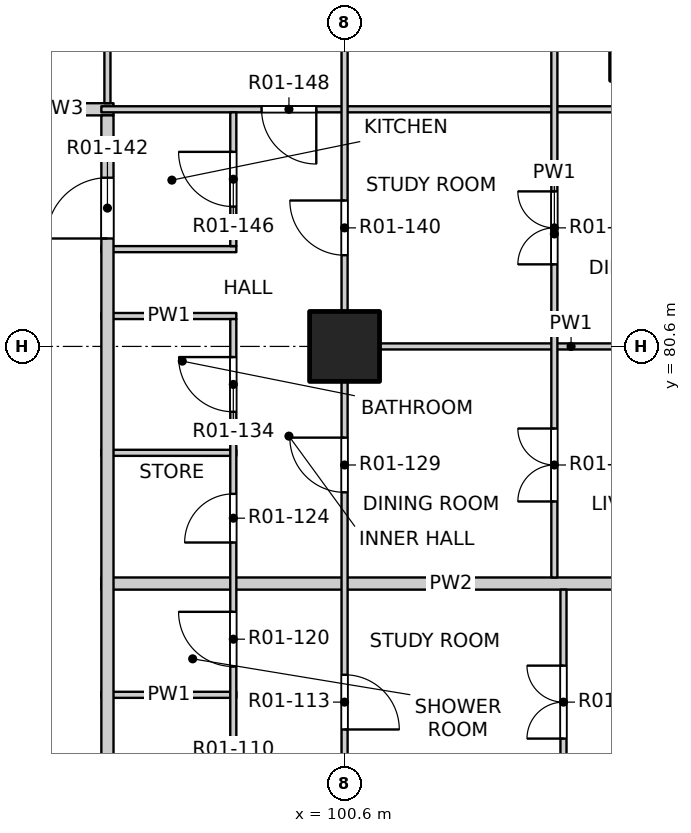
"""IFC4 building model, lengths in metres.
Left out: names, types, materials, properties, quantities, classifications, styles, units other than length and angle.
Written with IfcOpenShell. Run it as: python <this file> out.ifc"""

import sys

from ifc_helpers import new_model, si_unit, direction, frame, frame_2d, origin, origin_2d, place, context, subcontext, project, spatial, rectangle, extrude, element, fill, save


model = new_model("IFC4")
c1 = context("Model", 3, precision=1e-05, world=origin(), true_north=direction((0.0, 1.0)))
c2 = subcontext(c1, "Body", "Model", "MODEL_VIEW")
j1 = project(units=[si_unit("LENGTHUNIT", "METRE"), si_unit("PLANEANGLEUNIT", "RADIAN")], contexts=[c1])
p1 = place(None, origin())
s1 = spatial("IfcSite", under=j1, at=p1, CompositionType="ELEMENT")
p2 = place(p1, origin())
s2 = spatial("IfcBuilding", under=s1, at=p2, CompositionType="ELEMENT")
p3 = place(p2, frame((0.0, 0.0, 19.5)))
s3 = spatial("IfcBuildingStorey", under=s2, at=p3, CompositionType="ELEMENT", Elevation=19.5)
p4 = place(p3, frame((105.5, 85.5, -0.25), z_axis=(0.0, 0.0, 1.0), x_axis=(1.0, 0.0, 0.0)))
e1 = element("IfcColumn", 1, at=p4, inside=s3, PredefinedType="COLUMN", context=c2, shape_type="SweptSolid", body=[
    extrude(rectangle(XDim=1.05, YDim=1.05, at=origin_2d()), origin(), (0.0, 0.0, 1.0), 3.4),
])
p5 = place(p3, frame((100.6, 80.6, -0.25), z_axis=(0.0, 0.0, 1.0), x_axis=(1.0, 0.0, 0.0)))
e2 = element("IfcColumn", 2, at=p5, inside=s3, PredefinedType="COLUMN", context=c2, shape_type="SweptSolid", body=[
    extrude(rectangle(XDim=1.15, YDim=1.15, at=origin_2d()), origin(), (0.0, 0.0, 1.0), 3.4),
])
p6 = place(p3, frame((96.6, 74.87, 0.0), z_axis=(0.0, 0.0, 1.0), x_axis=(1.0, 0.0, 0.0)))
e3 = element("IfcWall", 3, at=p6, inside=s3, PredefinedType="PARTITIONING", context=c2, shape_type="SweptSolid", body=[
    extrude(rectangle(XDim=2.22, YDim=0.1, at=frame_2d((1.11, 0.0))), origin(), (0.0, 0.0, 1.0), 3.15),
])
p7 = place(p3, frame((96.6, 76.7, 0.0), z_axis=(0.0, 0.0, 1.0), x_axis=(1.0, 0.0, 0.0)))
e4 = element("IfcWall", 4, at=p7, inside=s3, PredefinedType="PARTITIONING", context=c2, shape_type="SweptSolid", body=[
    extrude(rectangle(XDim=11.5, YDim=0.2, at=frame_2d((5.75, 0.0))), origin(), (0.0, 0.0, 1.0), 3.15),
])
p8 = place(p3, frame((96.6, 78.85, 0.0), z_axis=(0.0, 0.0, 1.0), x_axis=(1.0, 0.0, 0.0)))
e5 = element("IfcWall", 5, at=p8, inside=s3, PredefinedType="PARTITIONING", context=c2, shape_type="SweptSolid", body=[
    extrude(rectangle(XDim=2.22, YDim=0.1, at=frame_2d((1.11, 0.0))), origin(), (0.0, 0.0, 1.0), 3.15),
])
p9 = place(p3, frame((100.55, 80.6, 0.0), z_axis=(0.0, 0.0, 1.0), x_axis=(1.0, 0.0, 0.0)))
e6 = element("IfcWall", 6, at=p9, inside=s3, PredefinedType="PARTITIONING", context=c2, shape_type="SweptSolid", body=[
    extrude(rectangle(XDim=7.55, YDim=0.1, at=frame_2d((3.775, 0.0))), origin(), (0.0, 0.0, 1.0), 2.55),
])
for number, where, z_axis, x_axis in (
    (7, (96.6, 81.1, 0.0), (0.0, 0.0, 1.0), (1.0, 0.0, 0.0)),
    (8, (96.6, 82.2, 0.0), (0.0, 0.0, 1.0), (1.0, 0.0, 0.0)),
):
    element("IfcWall", number, at=place(p3, frame(where, z_axis=z_axis, x_axis=x_axis)), inside=s3, PredefinedType="PARTITIONING", context=c2, shape_type="SweptSolid", body=[
        extrude(rectangle(XDim=2.22, YDim=0.1, at=frame_2d((1.11, 0.0))), origin(), (0.0, 0.0, 1.0), 3.15),
    ])
p10 = place(p3, frame((95.1, 84.5, 0.0), z_axis=(0.0, 0.0, 1.0), x_axis=(1.0, 0.0, 0.0)))
e9 = element("IfcWall", 9, at=p10, inside=s3, PredefinedType="PARTITIONING", context=c2, shape_type="SweptSolid", body=[
    extrude(rectangle(XDim=1.7, YDim=0.2, at=frame_2d((0.85, 0.0))), origin(), (0.0, 0.0, 1.0), 3.15),
])
p11 = place(p3, frame((96.6, 84.5, 0.0), z_axis=(0.0, 0.0, 1.0), x_axis=(1.0, 0.0, 0.0)))
e10 = element("IfcWall", 10, at=p11, inside=s3, PredefinedType="PARTITIONING", context=c2, shape_type="SweptSolid", body=[
    extrude(rectangle(XDim=11.5, YDim=0.1, at=frame_2d((5.75, 0.0))), origin(), (0.0, 0.0, 1.0), 3.15),
])
p12 = place(p11, frame((2.635, 0.0, 0.0)))
e11 = element("IfcOpeningElement", 11, at=p12, cuts=e10, PredefinedType="OPENING", context=c2, shape_type="SweptSolid", body=[
    extrude(rectangle(XDim=0.9, YDim=2.1, at=frame_2d((0.45, 1.05))), frame((0.0, 0.06, 0.0), z_axis=(0.0, -1.0, 0.0), x_axis=(1.0, 0.0, 0.0)), (0.0, 0.0, 1.0), 0.12),
])
p13 = place(p3, frame((96.7, 53.4, 0.0), z_axis=(0.0, 0.0, 1.0), x_axis=(0.0, 1.0, 0.0)))
e12 = element("IfcWall", 12, at=p13, inside=s3, PredefinedType="PARTITIONING", context=c2, shape_type="SweptSolid", body=[
    extrude(rectangle(XDim=31.0, YDim=0.2, at=frame_2d((15.5, 0.0))), origin(), (0.0, 0.0, 1.0), 3.15),
])
p14 = place(p13, frame((5.575, 0.0, 0.0)))
e13 = element("IfcOpeningElement", 13, at=p14, cuts=e12, PredefinedType="OPENING", context=c2, shape_type="SweptSolid", body=[
    extrude(rectangle(XDim=1.0, YDim=2.1, at=frame_2d((0.5, 1.05))), frame((0.0, 0.11, 0.0), z_axis=(0.0, -1.0, 0.0), x_axis=(1.0, 0.0, 0.0)), (0.0, 0.0, 1.0), 0.22),
])
p15 = place(p13, frame((10.075, 0.0, 0.0)))
e14 = element("IfcOpeningElement", 14, at=p15, cuts=e12, PredefinedType="OPENING", context=c2, shape_type="SweptSolid", body=[
    extrude(rectangle(XDim=1.0, YDim=2.1, at=frame_2d((0.5, 1.05))), frame((0.0, 0.11, 0.0), z_axis=(0.0, -1.0, 0.0), x_axis=(1.0, 0.0, 0.0)), (0.0, 0.0, 1.0), 0.22),
])
p16 = place(p13, frame((28.975, 0.0, 0.0)))
e15 = element("IfcOpeningElement", 15, at=p16, cuts=e12, PredefinedType="OPENING", context=c2, shape_type="SweptSolid", body=[
    extrude(rectangle(XDim=1.0, YDim=2.1, at=frame_2d((0.5, 1.05))), frame((0.0, 0.11, 0.0), z_axis=(0.0, -1.0, 0.0), x_axis=(1.0, 0.0, 0.0)), (0.0, 0.0, 1.0), 0.22),
])
p17 = place(p3, frame((96.7, 84.6, 0.0), z_axis=(0.0, 0.0, 1.0), x_axis=(0.0, 1.0, 0.0)))
e16 = element("IfcWall", 16, at=p17, inside=s3, PredefinedType="PARTITIONING", context=c2, shape_type="SweptSolid", body=[
    extrude(rectangle(XDim=3.5, YDim=0.1, at=frame_2d((1.75, 0.0))), origin(), (0.0, 0.0, 1.0), 3.15),
])
p18 = place(p17, frame((1.4, 0.0, 0.0)))
e17 = element("IfcOpeningElement", 17, at=p18, cuts=e16, PredefinedType="OPENING", context=c2, shape_type="SweptSolid", body=[
    extrude(rectangle(XDim=0.9, YDim=2.1, at=frame_2d((0.45, 1.05))), frame((0.0, 0.06, 0.0), z_axis=(0.0, -1.0, 0.0), x_axis=(1.0, 0.0, 0.0)), (0.0, 0.0, 1.0), 0.12),
])
p19 = place(p3, frame((98.77, 63.35, 0.0), z_axis=(0.0, 0.0, 1.0), x_axis=(0.0, 1.0, 0.0)))
e18 = element("IfcWall", 18, at=p19, inside=s3, PredefinedType="PARTITIONING", context=c2, shape_type="SweptSolid", body=[
    extrude(rectangle(XDim=17.7, YDim=0.1, at=frame_2d((8.85, 0.0))), origin(), (0.0, 0.0, 1.0), 3.15),
])
p20 = place(p19, frame((1.0, 0.0, 0.0)))
e19 = element("IfcOpeningElement", 19, at=p20, cuts=e18, PredefinedType="OPENING", context=c2, shape_type="SweptSolid", body=[
    extrude(rectangle(XDim=0.8, YDim=2.1, at=frame_2d((0.4, 1.05))), frame((0.0, 0.06, 0.0), z_axis=(0.0, -1.0, 0.0), x_axis=(1.0, 0.0, 0.0)), (0.0, 0.0, 1.0), 0.12),
])
p21 = place(p19, frame((3.9, 0.0, 0.0)))
e20 = element("IfcOpeningElement", 20, at=p21, cuts=e18, PredefinedType="OPENING", context=c2, shape_type="SweptSolid", body=[
    extrude(rectangle(XDim=0.8, YDim=2.1, at=frame_2d((0.4, 1.05))), frame((0.0, 0.06, 0.0), z_axis=(0.0, -1.0, 0.0), x_axis=(1.0, 0.0, 0.0)), (0.0, 0.0, 1.0), 0.12),
])
p22 = place(p19, frame((6.5, 0.0, 0.0)))
e21 = element("IfcOpeningElement", 21, at=p22, cuts=e18, PredefinedType="OPENING", context=c2, shape_type="SweptSolid", body=[
    extrude(rectangle(XDim=0.9, YDim=2.1, at=frame_2d((0.45, 1.05))), frame((0.0, 0.06, 0.0), z_axis=(0.0, -1.0, 0.0), x_axis=(1.0, 0.0, 0.0)), (0.0, 0.0, 1.0), 0.12),
])
p23 = place(p19, frame((9.385, 0.0, 0.0)))
e22 = element("IfcOpeningElement", 22, at=p23, cuts=e18, PredefinedType="OPENING", context=c2, shape_type="SweptSolid", body=[
    extrude(rectangle(XDim=0.9, YDim=2.1, at=frame_2d((0.45, 1.05))), frame((0.0, 0.06, 0.0), z_axis=(0.0, -1.0, 0.0), x_axis=(1.0, 0.0, 0.0)), (0.0, 0.0, 1.0), 0.12),
])
p24 = place(p19, frame((11.985, 0.0, 0.0)))
e23 = element("IfcOpeningElement", 23, at=p24, cuts=e18, PredefinedType="OPENING", context=c2, shape_type="SweptSolid", body=[
    extrude(rectangle(XDim=0.9, YDim=2.1, at=frame_2d((0.45, 1.05))), frame((0.0, 0.06, 0.0), z_axis=(0.0, -1.0, 0.0), x_axis=(1.0, 0.0, 0.0)), (0.0, 0.0, 1.0), 0.12),
])
p25 = place(p19, frame((14.025, 0.0, 0.0)))
e24 = element("IfcOpeningElement", 24, at=p25, cuts=e18, PredefinedType="OPENING", context=c2, shape_type="SweptSolid", body=[
    extrude(rectangle(XDim=0.8, YDim=2.1, at=frame_2d((0.4, 1.05))), frame((0.0, 0.06, 0.0), z_axis=(0.0, -1.0, 0.0), x_axis=(1.0, 0.0, 0.0)), (0.0, 0.0, 1.0), 0.12),
])
p26 = place(p19, frame((16.175, 0.0, 0.0)))
e25 = element("IfcOpeningElement", 25, at=p26, cuts=e18, PredefinedType="OPENING", context=c2, shape_type="SweptSolid", body=[
    extrude(rectangle(XDim=0.9, YDim=2.1, at=frame_2d((0.45, 1.05))), frame((0.0, 0.06, 0.0), z_axis=(0.0, -1.0, 0.0), x_axis=(1.0, 0.0, 0.0)), (0.0, 0.0, 1.0), 0.12),
])
p27 = place(p3, frame((98.77, 82.25, 0.0), z_axis=(0.0, 0.0, 1.0), x_axis=(0.0, 1.0, 0.0)))
e26 = element("IfcWall", 26, at=p27, inside=s3, PredefinedType="PARTITIONING", context=c2, shape_type="SweptSolid", body=[
    extrude(rectangle(XDim=2.2, YDim=0.1, at=frame_2d((1.1, 0.0))), origin(), (0.0, 0.0, 1.0), 3.15),
])
p28 = place(p27, frame((0.65, 0.0, 0.0)))
e27 = element("IfcOpeningElement", 27, at=p28, cuts=e26, PredefinedType="OPENING", context=c2, shape_type="SweptSolid", body=[
    extrude(rectangle(XDim=0.9, YDim=2.1, at=frame_2d((0.45, 1.05))), frame((0.0, 0.06, 0.0), z_axis=(0.0, -1.0, 0.0), x_axis=(1.0, 0.0, 0.0)), (0.0, 0.0, 1.0), 0.12),
])
p29 = place(p3, frame((100.6, 49.4, 0.0), z_axis=(0.0, 0.0, 1.0), x_axis=(0.0, 1.0, 0.0)))
e28 = element("IfcWall", 28, at=p29, inside=s3, PredefinedType="PARTITIONING", context=c2, shape_type="SweptSolid", body=[
    extrude(rectangle(XDim=31.2, YDim=0.1, at=frame_2d((15.6, 0.0))), origin(), (0.0, 0.0, 1.0), 3.15),
])
p30 = place(p29, frame((1.5, 0.0, 0.0)))
e29 = element("IfcOpeningElement", 29, at=p30, cuts=e28, PredefinedType="OPENING", context=c2, shape_type="SweptSolid", body=[
    extrude(rectangle(XDim=0.9, YDim=2.1, at=frame_2d((0.45, 1.05))), frame((0.0, 0.06, 0.0), z_axis=(0.0, -1.0, 0.0), x_axis=(1.0, 0.0, 0.0)), (0.0, 0.0, 1.0), 0.12),
])
p31 = place(p29, frame((5.4, 0.0, 0.0)))
e30 = element("IfcOpeningElement", 30, at=p31, cuts=e28, PredefinedType="OPENING", context=c2, shape_type="SweptSolid", body=[
    extrude(rectangle(XDim=0.9, YDim=2.1, at=frame_2d((0.45, 1.05))), frame((0.0, 0.06, 0.0), z_axis=(0.0, -1.0, 0.0), x_axis=(1.0, 0.0, 0.0)), (0.0, 0.0, 1.0), 0.12),
])
p32 = place(p29, frame((10.275, 0.0, 0.0)))
e31 = element("IfcOpeningElement", 31, at=p32, cuts=e28, PredefinedType="OPENING", context=c2, shape_type="SweptSolid", body=[
    extrude(rectangle(XDim=0.9, YDim=2.1, at=frame_2d((0.45, 1.05))), frame((0.0, 0.06, 0.0), z_axis=(0.0, -1.0, 0.0), x_axis=(1.0, 0.0, 0.0)), (0.0, 0.0, 1.0), 0.12),
])
p33 = place(p29, frame((14.0, 0.0, 0.0)))
e32 = element("IfcOpeningElement", 32, at=p33, cuts=e28, PredefinedType="OPENING", context=c2, shape_type="SweptSolid", body=[
    extrude(rectangle(XDim=0.9, YDim=2.1, at=frame_2d((0.45, 1.05))), frame((0.0, 0.06, 0.0), z_axis=(0.0, -1.0, 0.0), x_axis=(1.0, 0.0, 0.0)), (0.0, 0.0, 1.0), 0.12),
])
p34 = place(p29, frame((17.1, 0.0, 0.0)))
e33 = element("IfcOpeningElement", 33, at=p34, cuts=e28, PredefinedType="OPENING", context=c2, shape_type="SweptSolid", body=[
    extrude(rectangle(XDim=0.9, YDim=2.1, at=frame_2d((0.45, 1.05))), frame((0.0, 0.06, 0.0), z_axis=(0.0, -1.0, 0.0), x_axis=(1.0, 0.0, 0.0)), (0.0, 0.0, 1.0), 0.12),
])
p35 = place(p29, frame((21.8, 0.0, 0.0)))
e34 = element("IfcOpeningElement", 34, at=p35, cuts=e28, PredefinedType="OPENING", context=c2, shape_type="SweptSolid", body=[
    extrude(rectangle(XDim=0.9, YDim=2.1, at=frame_2d((0.45, 1.05))), frame((0.0, 0.06, 0.0), z_axis=(0.0, -1.0, 0.0), x_axis=(1.0, 0.0, 0.0)), (0.0, 0.0, 1.0), 0.12),
])
p36 = place(p29, frame((24.9, 0.0, 0.0)))
e35 = element("IfcOpeningElement", 35, at=p36, cuts=e28, PredefinedType="OPENING", context=c2, shape_type="SweptSolid", body=[
    extrude(rectangle(XDim=0.9, YDim=2.1, at=frame_2d((0.45, 1.05))), frame((0.0, 0.06, 0.0), z_axis=(0.0, -1.0, 0.0), x_axis=(1.0, 0.0, 0.0)), (0.0, 0.0, 1.0), 0.12),
])
p37 = place(p29, frame((28.8, 0.0, 0.0)))
e36 = element("IfcOpeningElement", 36, at=p37, cuts=e28, PredefinedType="OPENING", context=c2, shape_type="SweptSolid", body=[
    extrude(rectangle(XDim=0.9, YDim=2.1, at=frame_2d((0.45, 1.05))), frame((0.0, 0.06, 0.0), z_axis=(0.0, -1.0, 0.0), x_axis=(1.0, 0.0, 0.0)), (0.0, 0.0, 1.0), 0.12),
])
p38 = place(p3, frame((100.6, 80.6, 0.0), z_axis=(0.0, 0.0, 1.0), x_axis=(0.0, 1.0, 0.0)))
e37 = element("IfcWall", 37, at=p38, inside=s3, PredefinedType="PARTITIONING", context=c2, shape_type="SweptSolid", body=[
    extrude(rectangle(XDim=7.5, YDim=0.1, at=frame_2d((3.75, 0.0))), origin(), (0.0, 0.0, 1.0), 2.55),
])
p39 = place(p38, frame((1.5, 0.0, 0.0)))
e38 = element("IfcOpeningElement", 38, at=p39, cuts=e37, PredefinedType="OPENING", context=c2, shape_type="SweptSolid", body=[
    extrude(rectangle(XDim=0.9, YDim=2.1, at=frame_2d((0.45, 1.05))), frame((0.0, 0.06, 0.0), z_axis=(0.0, -1.0, 0.0), x_axis=(1.0, 0.0, 0.0)), (0.0, 0.0, 1.0), 0.12),
])
p40 = place(p38, frame((5.4, 0.0, 0.0)))
e39 = element("IfcOpeningElement", 39, at=p40, cuts=e37, PredefinedType="OPENING", context=c2, shape_type="SweptSolid", body=[
    extrude(rectangle(XDim=0.9, YDim=2.1, at=frame_2d((0.45, 1.05))), frame((0.0, 0.06, 0.0), z_axis=(0.0, -1.0, 0.0), x_axis=(1.0, 0.0, 0.0)), (0.0, 0.0, 1.0), 0.12),
])
p41 = place(p3, frame((104.05, 76.8, 0.0), z_axis=(0.0, 0.0, 1.0), x_axis=(0.0, 1.0, 0.0)))
e40 = element("IfcWall", 40, at=p41, inside=s3, PredefinedType="PARTITIONING", context=c2, shape_type="SweptSolid", body=[
    extrude(rectangle(XDim=11.3, YDim=0.1, at=frame_2d((5.65, 0.0))), origin(), (0.0, 0.0, 1.0), 3.15),
])
p42 = place(p41, frame((1.25, 0.0, 0.0)))
e41 = element("IfcOpeningElement", 41, at=p42, cuts=e40, PredefinedType="OPENING", context=c2, shape_type="SweptSolid", body=[
    extrude(rectangle(XDim=1.2, YDim=2.1, at=frame_2d((0.6, 1.05))), frame((0.0, 0.06, 0.0), z_axis=(0.0, -1.0, 0.0), x_axis=(1.0, 0.0, 0.0)), (0.0, 0.0, 1.0), 0.12),
])
p43 = place(p41, frame((5.15, 0.0, 0.0)))
e42 = element("IfcOpeningElement", 42, at=p43, cuts=e40, PredefinedType="OPENING", context=c2, shape_type="SweptSolid", body=[
    extrude(rectangle(XDim=1.2, YDim=2.1, at=frame_2d((0.6, 1.05))), frame((0.0, 0.06, 0.0), z_axis=(0.0, -1.0, 0.0), x_axis=(1.0, 0.0, 0.0)), (0.0, 0.0, 1.0), 0.12),
])
p44 = place(p41, frame((9.05, 0.0, 0.0)))
e43 = element("IfcOpeningElement", 43, at=p44, cuts=e40, PredefinedType="OPENING", context=c2, shape_type="SweptSolid", body=[
    extrude(rectangle(XDim=1.2, YDim=2.1, at=frame_2d((0.6, 1.05))), frame((0.0, 0.06, 0.0), z_axis=(0.0, -1.0, 0.0), x_axis=(1.0, 0.0, 0.0)), (0.0, 0.0, 1.0), 0.12),
])
p45 = place(p3, frame((104.2, 61.2, 0.0), z_axis=(0.0, 0.0, 1.0), x_axis=(0.0, 1.0, 0.0)))
e44 = element("IfcWall", 44, at=p45, inside=s3, PredefinedType="PARTITIONING", context=c2, shape_type="SweptSolid", body=[
    extrude(rectangle(XDim=15.4, YDim=0.1, at=frame_2d((7.7, 0.0))), origin(), (0.0, 0.0, 1.0), 3.15),
])
p46 = place(p45, frame((0.425, 0.0, 0.0)))
e45 = element("IfcOpeningElement", 45, at=p46, cuts=e44, PredefinedType="OPENING", context=c2, shape_type="SweptSolid", body=[
    extrude(rectangle(XDim=0.9, YDim=2.1, at=frame_2d((0.45, 1.05))), frame((0.0, 0.06, 0.0), z_axis=(0.0, -1.0, 0.0), x_axis=(1.0, 0.0, 0.0)), (0.0, 0.0, 1.0), 0.12),
])
p47 = place(p45, frame((2.375, 0.0, 0.0)))
e46 = element("IfcOpeningElement", 46, at=p47, cuts=e44, PredefinedType="OPENING", context=c2, shape_type="SweptSolid", body=[
    extrude(rectangle(XDim=0.9, YDim=2.1, at=frame_2d((0.45, 1.05))), frame((0.0, 0.06, 0.0), z_axis=(0.0, -1.0, 0.0), x_axis=(1.0, 0.0, 0.0)), (0.0, 0.0, 1.0), 0.12),
])
p48 = place(p45, frame((5.15, 0.0, 0.0)))
e47 = element("IfcOpeningElement", 47, at=p48, cuts=e44, PredefinedType="OPENING", context=c2, shape_type="SweptSolid", body=[
    extrude(rectangle(XDim=1.2, YDim=2.1, at=frame_2d((0.6, 1.05))), frame((0.0, 0.06, 0.0), z_axis=(0.0, -1.0, 0.0), x_axis=(1.0, 0.0, 0.0)), (0.0, 0.0, 1.0), 0.12),
])
p49 = place(p45, frame((8.225, 0.0, 0.0)))
e48 = element("IfcOpeningElement", 48, at=p49, cuts=e44, PredefinedType="OPENING", context=c2, shape_type="SweptSolid", body=[
    extrude(rectangle(XDim=0.9, YDim=2.1, at=frame_2d((0.45, 1.05))), frame((0.0, 0.06, 0.0), z_axis=(0.0, -1.0, 0.0), x_axis=(1.0, 0.0, 0.0)), (0.0, 0.0, 1.0), 0.12),
])
p50 = place(p45, frame((10.175, 0.0, 0.0)))
e49 = element("IfcOpeningElement", 49, at=p50, cuts=e44, PredefinedType="OPENING", context=c2, shape_type="SweptSolid", body=[
    extrude(rectangle(XDim=0.9, YDim=2.1, at=frame_2d((0.45, 1.05))), frame((0.0, 0.06, 0.0), z_axis=(0.0, -1.0, 0.0), x_axis=(1.0, 0.0, 0.0)), (0.0, 0.0, 1.0), 0.12),
])
p51 = place(p45, frame((12.95, 0.0, 0.0)))
e50 = element("IfcOpeningElement", 50, at=p51, cuts=e44, PredefinedType="OPENING", context=c2, shape_type="SweptSolid", body=[
    extrude(rectangle(XDim=1.2, YDim=2.1, at=frame_2d((0.6, 1.05))), frame((0.0, 0.06, 0.0), z_axis=(0.0, -1.0, 0.0), x_axis=(1.0, 0.0, 0.0)), (0.0, 0.0, 1.0), 0.12),
])
p52 = place(p36, origin())
e51 = element("IfcDoor", 51, at=p52, inside=s3, OperationType="SINGLE_SWING_RIGHT", PredefinedType="DOOR", context=c2, shape_type="SweptSolid", body=[
    extrude(rectangle(XDim=0.9, YDim=2.1, at=frame_2d((0.45, 1.05))), frame((0.0, 0.025, 0.0), z_axis=(0.0, -1.0, 0.0), x_axis=(1.0, 0.0, 0.0)), (0.0, 0.0, 1.0), 0.05),
])
fill(e35, e51)
p53 = place(p51, origin())
e52 = element("IfcDoor", 52, at=p53, inside=s3, OperationType="DOUBLE_DOOR_SINGLE_SWING", PredefinedType="DOOR", context=c2, shape_type="SweptSolid", body=[
    extrude(rectangle(XDim=1.2, YDim=2.1, at=frame_2d((0.6, 1.05))), frame((0.0, 0.025, 0.0), z_axis=(0.0, -1.0, 0.0), x_axis=(1.0, 0.0, 0.0)), (0.0, 0.0, 1.0), 0.05),
])
fill(e50, e52)
p54 = place(p24, origin())
e53 = element("IfcDoor", 53, at=p54, inside=s3, OperationType="SINGLE_SWING_RIGHT", PredefinedType="DOOR", context=c2, shape_type="SweptSolid", body=[
    extrude(rectangle(XDim=0.9, YDim=2.1, at=frame_2d((0.45, 1.05))), frame((0.0, 0.025, 0.0), z_axis=(0.0, -1.0, 0.0), x_axis=(1.0, 0.0, 0.0)), (0.0, 0.0, 1.0), 0.05),
])
fill(e23, e53)
p55 = place(p25, origin())
e54 = element("IfcDoor", 54, at=p55, inside=s3, OperationType="SINGLE_SWING_LEFT", PredefinedType="DOOR", context=c2, shape_type="SweptSolid", body=[
    extrude(rectangle(XDim=0.8, YDim=2.1, at=frame_2d((0.4, 1.05))), frame((0.0, 0.025, 0.0), z_axis=(0.0, -1.0, 0.0), x_axis=(1.0, 0.0, 0.0)), (0.0, 0.0, 1.0), 0.05),
])
fill(e24, e54)
p56 = place(p37, origin())
e55 = element("IfcDoor", 55, at=p56, inside=s3, OperationType="SINGLE_SWING_RIGHT", PredefinedType="DOOR", context=c2, shape_type="SweptSolid", body=[
    extrude(rectangle(XDim=0.9, YDim=2.1, at=frame_2d((0.45, 1.05))), frame((0.0, 0.025, 0.0), z_axis=(0.0, -1.0, 0.0), x_axis=(1.0, 0.0, 0.0)), (0.0, 0.0, 1.0), 0.05),
])
fill(e36, e55)
p57 = place(p42, origin())
e56 = element("IfcDoor", 56, at=p57, inside=s3, OperationType="DOUBLE_DOOR_SINGLE_SWING", PredefinedType="DOOR", context=c2, shape_type="SweptSolid", body=[
    extrude(rectangle(XDim=1.2, YDim=2.1, at=frame_2d((0.6, 1.05))), frame((0.0, 0.025, 0.0), z_axis=(0.0, -1.0, 0.0), x_axis=(1.0, 0.0, 0.0)), (0.0, 0.0, 1.0), 0.05),
])
fill(e41, e56)
p58 = place(p26, origin())
e57 = element("IfcDoor", 57, at=p58, inside=s3, OperationType="SINGLE_SWING_RIGHT", PredefinedType="DOOR", context=c2, shape_type="SweptSolid", body=[
    extrude(rectangle(XDim=0.9, YDim=2.1, at=frame_2d((0.45, 1.05))), frame((0.0, 0.025, 0.0), z_axis=(0.0, -1.0, 0.0), x_axis=(1.0, 0.0, 0.0)), (0.0, 0.0, 1.0), 0.05),
])
fill(e25, e57)
p59 = place(p39, origin())
e58 = element("IfcDoor", 58, at=p59, inside=s3, OperationType="SINGLE_SWING_RIGHT", PredefinedType="DOOR", context=c2, shape_type="SweptSolid", body=[
    extrude(rectangle(XDim=0.9, YDim=2.1, at=frame_2d((0.45, 1.05))), frame((0.0, 0.025, 0.0), z_axis=(0.0, -1.0, 0.0), x_axis=(1.0, 0.0, 0.0)), (0.0, 0.0, 1.0), 0.05),
])
fill(e38, e58)
p60 = place(p43, origin())
e59 = element("IfcDoor", 59, at=p60, inside=s3, OperationType="DOUBLE_DOOR_SINGLE_SWING", PredefinedType="DOOR", context=c2, shape_type="SweptSolid", body=[
    extrude(rectangle(XDim=1.2, YDim=2.1, at=frame_2d((0.6, 1.05))), frame((0.0, 0.025, 0.0), z_axis=(0.0, -1.0, 0.0), x_axis=(1.0, 0.0, 0.0)), (0.0, 0.0, 1.0), 0.05),
])
fill(e42, e59)
p61 = place(p16, origin())
e60 = element("IfcDoor", 60, at=p61, inside=s3, OperationType="SINGLE_SWING_LEFT", PredefinedType="DOOR", context=c2, shape_type="SweptSolid", body=[
    extrude(rectangle(XDim=1.0, YDim=2.1, at=frame_2d((0.5, 1.05))), frame((0.0, 0.025, 0.0), z_axis=(0.0, -1.0, 0.0), x_axis=(1.0, 0.0, 0.0)), (0.0, 0.0, 1.0), 0.05),
])
fill(e15, e60)
p62 = place(p28, origin())
e61 = element("IfcDoor", 61, at=p62, inside=s3, OperationType="SINGLE_SWING_RIGHT", PredefinedType="DOOR", context=c2, shape_type="SweptSolid", body=[
    extrude(rectangle(XDim=0.9, YDim=2.1, at=frame_2d((0.45, 1.05))), frame((0.0, 0.025, 0.0), z_axis=(0.0, -1.0, 0.0), x_axis=(1.0, 0.0, 0.0)), (0.0, 0.0, 1.0), 0.05),
])
fill(e27, e61)
p63 = place(p12, origin())
e62 = element("IfcDoor", 62, at=p63, inside=s3, OperationType="SINGLE_SWING_LEFT", PredefinedType="DOOR", context=c2, shape_type="SweptSolid", body=[
    extrude(rectangle(XDim=0.9, YDim=2.1, at=frame_2d((0.45, 1.05))), frame((0.0, 0.025, 0.0), z_axis=(0.0, -1.0, 0.0), x_axis=(1.0, 0.0, 0.0)), (0.0, 0.0, 1.0), 0.05),
])
fill(e11, e62)
save(model, sys.argv[1])
